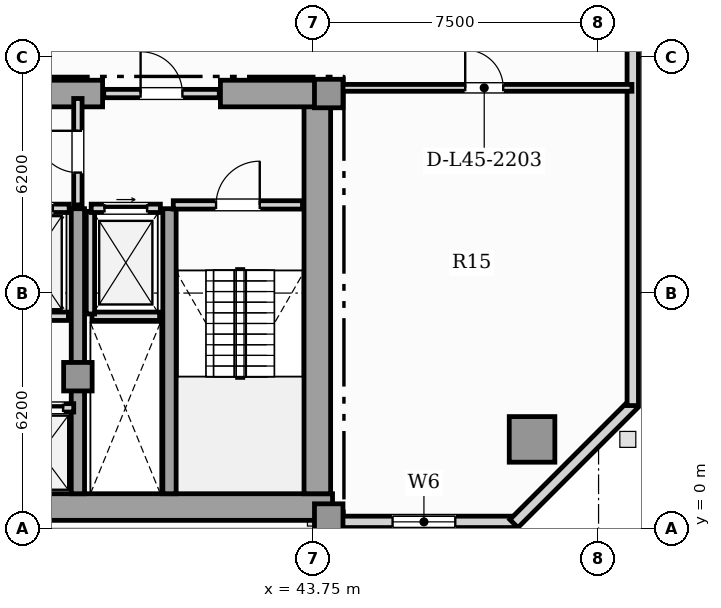
"""IFC4 building model, lengths in metres.
Left out: names, types, materials, properties, quantities, classifications, styles, units other than length and angle.
Written with IfcOpenShell. Run it as: python <this file> out.ifc"""

import sys

from ifc_helpers import new_model, si_unit, direction, frame, frame_2d, origin, origin_2d, place, context, subcontext, project, spatial, rectangle, hollow_rectangle, extrude, element, fill, save


model = new_model("IFC4")
c1 = context("Model", 3, precision=1e-05, world=origin(), true_north=direction((0.0, 1.0)))
c2 = subcontext(c1, "Body", "Model", "MODEL_VIEW")
j1 = project(units=[si_unit("LENGTHUNIT", "METRE"), si_unit("PLANEANGLEUNIT", "RADIAN")], contexts=[c1])
p1 = place(None, origin())
s1 = spatial("IfcSite", under=j1, at=p1, CompositionType="ELEMENT")
p2 = place(p1, origin())
s2 = spatial("IfcBuilding", under=s1, at=p2, CompositionType="ELEMENT")
p3 = place(p2, frame((0.0, 0.0, 183.7)))
s3 = spatial("IfcBuildingStorey", under=s2, at=p3, CompositionType="ELEMENT", Elevation=183.7)
p4 = place(p3, frame((13.25, 0.57, 0.0), z_axis=(0.0, 0.0, 1.0), x_axis=(1.0, 0.0, 0.0)))
e1 = element("IfcWall", 1, at=p4, inside=s3, PredefinedType="SHEAR", context=c2, shape_type="SweptSolid", body=[
    extrude(rectangle(XDim=31.0, YDim=0.7, at=frame_2d((15.5, 0.0))), origin(), (0.0, 0.0, 1.0), 3.63),
])
p5 = place(p3, frame((43.85, 0.92, 0.0), z_axis=(0.0, 0.0, 1.0), x_axis=(0.0, 1.0, 0.0)))
e2 = element("IfcWall", 2, at=p5, inside=s3, PredefinedType="SHEAR", context=c2, shape_type="SweptSolid", body=[
    extrude(rectangle(XDim=10.53, YDim=0.7, at=frame_2d((5.265, 0.0))), origin(), (0.0, 0.0, 1.0), 3.63),
])
p6 = place(p3, frame((30.9, 11.45, 0.0), z_axis=(0.0, 0.0, 1.0), x_axis=(1.0, 0.0, 0.0)))
e3 = element("IfcWall", 3, at=p6, inside=s3, PredefinedType="SHEAR", context=c2, shape_type="SweptSolid", body=[
    extrude(rectangle(XDim=7.3, YDim=0.7, at=frame_2d((3.65, 0.0))), origin(), (0.0, 0.0, 1.0), 3.63),
])
p7 = place(p3, frame((41.3, 11.45, 0.0), z_axis=(0.0, 0.0, 1.0), x_axis=(1.0, 0.0, 0.0)))
e4 = element("IfcWall", 4, at=p7, inside=s3, PredefinedType="SHEAR", context=c2, shape_type="SweptSolid", body=[
    extrude(rectangle(XDim=2.95, YDim=0.7, at=frame_2d((1.475, 0.0))), origin(), (0.0, 0.0, 1.0), 3.63),
])
for number, where, z_axis, x_axis in (
    (5, (37.55, 0.92, 0.0), (0.0, 0.0, 1.0), (0.0, 1.0, 0.0)),
    (6, (39.96, 0.92, 0.0), (0.0, 0.0, 1.0), (0.0, 1.0, 0.0)),
):
    element("IfcWall", number, at=place(p3, frame(where, z_axis=z_axis, x_axis=x_axis)), inside=s3, PredefinedType="SHEAR", context=c2, shape_type="SweptSolid", body=[
        extrude(rectangle(XDim=7.5, YDim=0.35, at=frame_2d((3.75, 0.0))), origin(), (0.0, 0.0, 1.0), 3.63),
    ])
for number, where, z_axis, x_axis in (
    (7, (44.15, 0.28, 0.0), (0.0, 0.0, 1.0), (1.0, 0.0, 0.0)),
    (8, (44.15, 11.45, 0.0), (0.0, 0.0, 1.0), (1.0, 0.0, 0.0)),
    (9, (37.55, 4.0, 0.0), (0.0, 0.0, 1.0), (1.0, 0.0, 0.0)),
):
    element("IfcColumn", number, at=place(p3, frame(where, z_axis=z_axis, x_axis=x_axis)), inside=s3, PredefinedType="COLUMN", context=c2, shape_type="SweptSolid", body=[
        extrude(rectangle(XDim=0.75, YDim=0.75, at=origin_2d()), origin(), (0.0, 0.0, 1.0), 3.85),
    ])
p8 = place(p3, frame((49.5, 2.35, 0.0), z_axis=(0.0, 0.0, 1.0), x_axis=(1.0, 0.0, 0.0)))
e10 = element("IfcColumn", 10, at=p8, inside=s3, PredefinedType="USERDEFINED", context=c2, shape_type="SweptSolid", body=[
    extrude(hollow_rectangle(XDim=1.2, YDim=1.2, WallThickness=0.07, at=origin_2d()), origin(), (0.0, 0.0, 1.0), 3.85),
])
p9 = place(p3, frame((44.25, 0.18, 0.0), z_axis=(0.0, 0.0, 1.0), x_axis=(1.0, 0.0, 0.0)))
e11 = element("IfcWall", 11, at=p9, inside=s3, PredefinedType="SOLIDWALL", context=c2, shape_type="SweptSolid", body=[
    extrude(rectangle(XDim=4.81, YDim=0.3, at=frame_2d((2.405, 0.0))), origin(), (0.0, 0.0, 1.0), 3.63),
])
p10 = place(p9, frame((1.58, 0.0, 0.88)))
e12 = element("IfcOpeningElement", 12, at=p10, cuts=e11, PredefinedType="OPENING", context=c2, shape_type="SweptSolid", body=[
    extrude(rectangle(XDim=1.65, YDim=2.0, at=frame_2d((0.825, 1.0))), frame((0.0, 0.16, 0.0), z_axis=(0.0, -1.0, 0.0), x_axis=(1.0, 0.0, 0.0)), (0.0, 0.0, 1.0), 0.32),
])
p11 = place(p3, frame((49.022, 0.135, 0.0), z_axis=(0.0, 0.0, 1.0), x_axis=(0.707106781187, 0.707106781187, 0.0)))
e13 = element("IfcWall", 13, at=p11, inside=s3, PredefinedType="SOLIDWALL", context=c2, shape_type="SweptSolid", body=[
    extrude(rectangle(XDim=4.445, YDim=0.3, at=frame_2d((2.223, 0.0))), origin(), (0.0, 0.0, 1.0), 3.63),
])
p12 = place(p3, frame((52.15, 3.24, 0.0), z_axis=(0.0, 0.0, 1.0), x_axis=(0.0, 1.0, 0.0)))
e14 = element("IfcWall", 14, at=p12, inside=s3, PredefinedType="SOLIDWALL", context=c2, shape_type="SweptSolid", body=[
    extrude(rectangle(XDim=33.92, YDim=0.3, at=frame_2d((16.96, 0.0))), origin(), (0.0, 0.0, 1.0), 3.63),
])
p13 = place(p12, frame((30.56, 0.0, 0.95)))
e15 = element("IfcOpeningElement", 15, at=p13, cuts=e14, PredefinedType="OPENING", context=c2, shape_type="SweptSolid", body=[
    extrude(rectangle(XDim=0.9, YDim=1.5, at=frame_2d((0.45, 0.75))), frame((0.0, 0.16, 0.0), z_axis=(0.0, -1.0, 0.0), x_axis=(1.0, 0.0, 0.0)), (0.0, 0.0, 1.0), 0.32),
])
p14 = place(p12, frame((11.056, 0.0, 0.95)))
e16 = element("IfcOpeningElement", 16, at=p14, cuts=e14, PredefinedType="OPENING", context=c2, shape_type="SweptSolid", body=[
    extrude(rectangle(XDim=0.9, YDim=1.5, at=frame_2d((0.45, 0.75))), frame((0.0, 0.16, 0.0), z_axis=(0.0, -1.0, 0.0), x_axis=(1.0, 0.0, 0.0)), (0.0, 0.0, 1.0), 0.32),
])
p15 = place(p12, frame((14.288, 0.0, 0.88)))
e17 = element("IfcOpeningElement", 17, at=p15, cuts=e14, PredefinedType="OPENING", context=c2, shape_type="SweptSolid", body=[
    extrude(rectangle(XDim=1.65, YDim=2.0, at=frame_2d((0.825, 1.0))), frame((0.0, 0.16, 0.0), z_axis=(0.0, -1.0, 0.0), x_axis=(1.0, 0.0, 0.0)), (0.0, 0.0, 1.0), 0.32),
])
p16 = place(p12, frame((19.552, 0.0, 0.88)))
e18 = element("IfcOpeningElement", 18, at=p16, cuts=e14, PredefinedType="OPENING", context=c2, shape_type="SweptSolid", body=[
    extrude(rectangle(XDim=1.65, YDim=2.0, at=frame_2d((0.825, 1.0))), frame((0.0, 0.16, 0.0), z_axis=(0.0, -1.0, 0.0), x_axis=(1.0, 0.0, 0.0)), (0.0, 0.0, 1.0), 0.32),
])
p17 = place(p12, frame((25.809, 0.0, 0.88)))
e19 = element("IfcOpeningElement", 19, at=p17, cuts=e14, PredefinedType="OPENING", context=c2, shape_type="SweptSolid", body=[
    extrude(rectangle(XDim=1.65, YDim=2.0, at=frame_2d((0.825, 1.0))), frame((0.0, 0.16, 0.0), z_axis=(0.0, -1.0, 0.0), x_axis=(1.0, 0.0, 0.0)), (0.0, 0.0, 1.0), 0.32),
])
p18 = place(p12, frame((32.24, 0.0, 0.95)))
e20 = element("IfcOpeningElement", 20, at=p18, cuts=e14, PredefinedType="OPENING", context=c2, shape_type="SweptSolid", body=[
    extrude(rectangle(XDim=0.9, YDim=1.5, at=frame_2d((0.45, 0.75))), frame((0.0, 0.16, 0.0), z_axis=(0.0, -1.0, 0.0), x_axis=(1.0, 0.0, 0.0)), (0.0, 0.0, 1.0), 0.32),
])
p19 = place(p3, frame((37.92, 5.59, 0.0), z_axis=(0.0, 0.0, 1.0), x_axis=(1.0, 0.0, 0.0)))
e21 = element("IfcWall", 21, at=p19, inside=s3, PredefinedType="SOLIDWALL", context=c2, shape_type="SweptSolid", body=[
    extrude(rectangle(XDim=1.78, YDim=0.22, at=frame_2d((0.89, 0.0))), origin(), (0.0, 0.0, 1.0), 3.63),
])
p20 = place(p3, frame((37.88, 5.65, 0.0), z_axis=(0.0, 0.0, 1.0), x_axis=(0.0, 1.0, 0.0)))
e22 = element("IfcWall", 22, at=p20, inside=s3, PredefinedType="SOLIDWALL", context=c2, shape_type="SweptSolid", body=[
    extrude(rectangle(XDim=2.7, YDim=0.22, at=frame_2d((1.35, 0.0))), origin(), (0.0, 0.0, 1.0), 3.63),
])
p21 = place(p3, frame((37.9, 8.43, 0.0), z_axis=(0.0, 0.0, 1.0), x_axis=(1.0, 0.0, 0.0)))
e23 = element("IfcWall", 23, at=p21, inside=s3, PredefinedType="SOLIDWALL", context=c2, shape_type="SweptSolid", body=[
    extrude(rectangle(XDim=1.82, YDim=0.22, at=frame_2d((0.91, 0.0))), origin(), (0.0, 0.0, 1.0), 3.63),
])
p22 = place(p21, frame((0.35, 0.0, 0.0)))
e24 = element("IfcOpeningElement", 24, at=p22, cuts=e23, PredefinedType="OPENING", context=c2, shape_type="SweptSolid", body=[
    extrude(rectangle(XDim=1.12, YDim=2.25, at=frame_2d((0.56, 1.125))), frame((0.0, 0.12, 0.0), z_axis=(0.0, -1.0, 0.0), x_axis=(1.0, 0.0, 0.0)), (0.0, 0.0, 1.0), 0.24),
])
p23 = place(p3, frame((35.3, 5.59, 0.0), z_axis=(0.0, 0.0, 1.0), x_axis=(1.0, 0.0, 0.0)))
e25 = element("IfcWall", 25, at=p23, inside=s3, PredefinedType="SOLIDWALL", context=c2, shape_type="SweptSolid", body=[
    extrude(rectangle(XDim=2.0, YDim=0.22, at=frame_2d((1.0, 0.0))), origin(), (0.0, 0.0, 1.0), 3.63),
])
p24 = place(p3, frame((35.28, 8.43, 0.0), z_axis=(0.0, 0.0, 1.0), x_axis=(1.0, 0.0, 0.0)))
e26 = element("IfcWall", 26, at=p24, inside=s3, PredefinedType="SOLIDWALL", context=c2, shape_type="SweptSolid", body=[
    extrude(rectangle(XDim=2.04, YDim=0.22, at=frame_2d((1.02, 0.0))), origin(), (0.0, 0.0, 1.0), 3.63),
])
p25 = place(p24, frame((0.43, 0.0, 0.0)))
e27 = element("IfcOpeningElement", 27, at=p25, cuts=e26, PredefinedType="OPENING", context=c2, shape_type="SweptSolid", body=[
    extrude(rectangle(XDim=1.18, YDim=2.2, at=frame_2d((0.59, 1.1))), frame((0.0, 0.12, 0.0), z_axis=(0.0, -1.0, 0.0), x_axis=(1.0, 0.0, 0.0)), (0.0, 0.0, 1.0), 0.24),
])
p26 = place(p3, frame((35.7, 3.18, 0.0), z_axis=(0.0, 0.0, 1.0), x_axis=(1.0, 0.0, 0.0)))
e28 = element("IfcWall", 28, at=p26, inside=s3, PredefinedType="SOLIDWALL", context=c2, shape_type="SweptSolid", body=[
    extrude(rectangle(XDim=1.74, YDim=0.22, at=frame_2d((0.87, 0.0))), origin(), (0.0, 0.0, 1.0), 3.63),
])
p27 = place(p26, frame((0.28, 0.0, 0.0)))
e29 = element("IfcOpeningElement", 29, at=p27, cuts=e28, PredefinedType="OPENING", context=c2, shape_type="SweptSolid", body=[
    extrude(rectangle(XDim=1.18, YDim=2.2, at=frame_2d((0.59, 1.1))), frame((0.0, 0.12, 0.0), z_axis=(0.0, -1.0, 0.0), x_axis=(1.0, 0.0, 0.0)), (0.0, 0.0, 1.0), 0.24),
])
p28 = place(p3, frame((40.06, 8.52, 0.0), z_axis=(0.0, 0.0, 1.0), x_axis=(1.0, 0.0, 0.0)))
e30 = element("IfcWall", 30, at=p28, inside=s3, PredefinedType="SOLIDWALL", context=c2, shape_type="SweptSolid", body=[
    extrude(rectangle(XDim=3.4, YDim=0.22, at=frame_2d((1.7, 0.0))), origin(), (0.0, 0.0, 1.0), 3.63),
])
p29 = place(p28, frame((1.125, 0.0, 0.0)))
e31 = element("IfcOpeningElement", 31, at=p29, cuts=e30, PredefinedType="OPENING", context=c2, shape_type="SweptSolid", body=[
    extrude(rectangle(XDim=1.15, YDim=2.2, at=frame_2d((0.575, 1.1))), frame((0.0, 0.12, 0.0), z_axis=(0.0, -1.0, 0.0), x_axis=(1.0, 0.0, 0.0)), (0.0, 0.0, 1.0), 0.24),
])
p30 = place(p3, frame((37.55, 8.52, 0.0), z_axis=(0.0, 0.0, 1.0), x_axis=(0.0, 1.0, 0.0)))
e32 = element("IfcWall", 32, at=p30, inside=s3, PredefinedType="SOLIDWALL", context=c2, shape_type="SweptSolid", body=[
    extrude(rectangle(XDim=2.8, YDim=0.22, at=frame_2d((1.4, 0.0))), origin(), (0.0, 0.0, 1.0), 3.085),
])
p31 = place(p30, frame((0.85, 0.0, 0.0)))
e33 = element("IfcOpeningElement", 33, at=p31, cuts=e32, PredefinedType="OPENING", context=c2, shape_type="SweptSolid", body=[
    extrude(rectangle(XDim=1.1, YDim=2.2, at=frame_2d((0.55, 1.1))), frame((0.0, 0.12, 0.0), z_axis=(0.0, -1.0, 0.0), x_axis=(1.0, 0.0, 0.0)), (0.0, 0.0, 1.0), 0.24),
])
p32 = place(p3, frame((38.23, 11.45, 0.0), z_axis=(0.0, 0.0, 1.0), x_axis=(1.0, 0.0, 0.0)))
e34 = element("IfcWall", 34, at=p32, inside=s3, PredefinedType="SOLIDWALL", context=c2, shape_type="SweptSolid", body=[
    extrude(rectangle(XDim=3.04, YDim=0.22, at=frame_2d((1.52, 0.0))), origin(), (0.0, 0.0, 1.0), 3.63),
])
p33 = place(p32, frame((0.97, 0.0, 0.0)))
e35 = element("IfcOpeningElement", 35, at=p33, cuts=e34, PredefinedType="OPENING", context=c2, shape_type="SweptSolid", body=[
    extrude(rectangle(XDim=1.1, YDim=2.2, at=frame_2d((0.55, 1.1))), frame((0.0, 0.12, 0.0), z_axis=(0.0, -1.0, 0.0), x_axis=(1.0, 0.0, 0.0)), (0.0, 0.0, 1.0), 0.24),
])
p34 = place(p3, frame((44.355, 11.6, 0.0), z_axis=(0.0, 0.0, 1.0), x_axis=(1.0, 0.0, 0.0)))
e36 = element("IfcWall", 36, at=p34, inside=s3, PredefinedType="PARTITIONING", context=c2, shape_type="SweptSolid", body=[
    extrude(rectangle(XDim=7.772, YDim=0.18, at=frame_2d((3.886, 0.0))), origin(), (0.0, 0.0, 1.0), 3.63),
])
p35 = place(p34, frame((3.386, 0.0, 0.0)))
e37 = element("IfcOpeningElement", 37, at=p35, cuts=e36, PredefinedType="OPENING", context=c2, shape_type="SweptSolid", body=[
    extrude(rectangle(XDim=1.0, YDim=2.15, at=frame_2d((0.5, 1.075))), frame((0.0, 0.1, 0.0), z_axis=(0.0, -1.0, 0.0), x_axis=(1.0, 0.0, 0.0)), (0.0, 0.0, 1.0), 0.2),
])
p36 = place(p10, origin())
e38 = element("IfcWindow", 38, at=p36, inside=s3, PartitioningType="SINGLE_PANEL", PredefinedType="WINDOW", context=c2, shape_type="SweptSolid", body=[
    extrude(rectangle(XDim=1.65, YDim=2.0, at=frame_2d((0.825, 1.0))), frame((0.0, 0.03, 0.0), z_axis=(0.0, -1.0, 0.0), x_axis=(1.0, 0.0, 0.0)), (0.0, 0.0, 1.0), 0.06),
])
fill(e12, e38)
p37 = place(p22, origin())
e39 = element("IfcDoor", 39, at=p37, inside=s3, OperationType="SLIDING_TO_RIGHT", PredefinedType="DOOR", context=c2, shape_type="SweptSolid", body=[
    extrude(rectangle(XDim=1.12, YDim=2.25, at=frame_2d((0.56, 1.125))), frame((0.0, 0.025, 0.0), z_axis=(0.0, -1.0, 0.0), x_axis=(1.0, 0.0, 0.0)), (0.0, 0.0, 1.0), 0.05),
])
fill(e24, e39)
p38 = place(p25, origin())
e40 = element("IfcDoor", 40, at=p38, inside=s3, OperationType="SLIDING_TO_LEFT", PredefinedType="DOOR", context=c2, shape_type="SweptSolid", body=[
    extrude(rectangle(XDim=1.18, YDim=2.2, at=frame_2d((0.59, 1.1))), frame((0.0, 0.025, 0.0), z_axis=(0.0, -1.0, 0.0), x_axis=(1.0, 0.0, 0.0)), (0.0, 0.0, 1.0), 0.05),
])
fill(e27, e40)
p39 = place(p27, origin())
e41 = element("IfcDoor", 41, at=p39, inside=s3, OperationType="SLIDING_TO_RIGHT", PredefinedType="DOOR", context=c2, shape_type="SweptSolid", body=[
    extrude(rectangle(XDim=1.18, YDim=2.2, at=frame_2d((0.59, 1.1))), frame((0.0, 0.025, 0.0), z_axis=(0.0, -1.0, 0.0), x_axis=(1.0, 0.0, 0.0)), (0.0, 0.0, 1.0), 0.05),
])
fill(e29, e41)
p40 = place(p29, origin())
e42 = element("IfcDoor", 42, at=p40, inside=s3, OperationType="SINGLE_SWING_RIGHT", PredefinedType="DOOR", context=c2, shape_type="SweptSolid", body=[
    extrude(rectangle(XDim=1.15, YDim=2.2, at=frame_2d((0.575, 1.1))), frame((0.0, 0.025, 0.0), z_axis=(0.0, -1.0, 0.0), x_axis=(1.0, 0.0, 0.0)), (0.0, 0.0, 1.0), 0.05),
])
fill(e31, e42)
p41 = place(p31, origin())
e43 = element("IfcDoor", 43, at=p41, inside=s3, OperationType="SINGLE_SWING_RIGHT", PredefinedType="DOOR", context=c2, shape_type="SweptSolid", body=[
    extrude(rectangle(XDim=1.1, YDim=2.2, at=frame_2d((0.55, 1.1))), frame((0.0, 0.025, 0.0), z_axis=(0.0, -1.0, 0.0), x_axis=(1.0, 0.0, 0.0)), (0.0, 0.0, 1.0), 0.05),
])
fill(e33, e43)
p42 = place(p33, origin())
e44 = element("IfcDoor", 44, at=p42, inside=s3, OperationType="SINGLE_SWING_LEFT", PredefinedType="DOOR", context=c2, shape_type="SweptSolid", body=[
    extrude(rectangle(XDim=1.1, YDim=2.2, at=frame_2d((0.55, 1.1))), frame((0.0, 0.025, 0.0), z_axis=(0.0, -1.0, 0.0), x_axis=(1.0, 0.0, 0.0)), (0.0, 0.0, 1.0), 0.05),
])
fill(e35, e44)
p43 = place(p35, origin())
e45 = element("IfcDoor", 45, at=p43, inside=s3, OperationType="SINGLE_SWING_LEFT", PredefinedType="DOOR", context=c2, shape_type="SweptSolid", body=[
    extrude(rectangle(XDim=1.0, YDim=2.15, at=frame_2d((0.5, 1.075))), frame((0.0, 0.025, 0.0), z_axis=(0.0, -1.0, 0.0), x_axis=(1.0, 0.0, 0.0)), (0.0, 0.0, 1.0), 0.05),
])
fill(e37, e45)
save(model, sys.argv[1])
